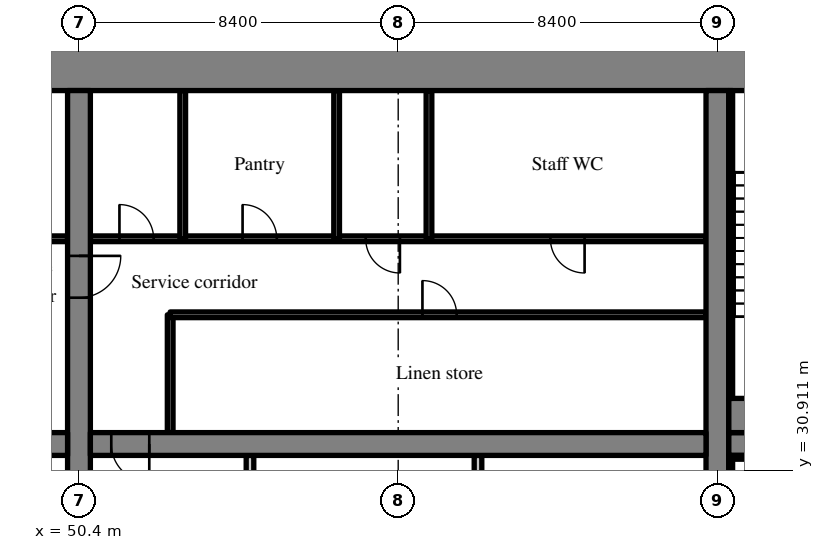
"""IFC4 building model, lengths in metres.
Left out: names, types, materials, properties, quantities, classifications, styles, units other than length and angle.
Written with IfcOpenShell. Run it as: python <this file> out.ifc"""

import sys

from ifc_helpers import new_model, si_unit, direction, frame, frame_2d, origin, place, context, subcontext, project, spatial, rectangle, extrude, source, transform, mapped, element, fill, save


model = new_model("IFC4")
c1 = context("Model", 3, precision=1e-05, world=origin(), true_north=direction((0.0, 1.0)))
c2 = subcontext(c1, "Body", "Model", "MODEL_VIEW")
j1 = project(units=[si_unit("LENGTHUNIT", "METRE"), si_unit("PLANEANGLEUNIT", "RADIAN")], contexts=[c1])
p1 = place(None, origin())
s1 = spatial("IfcSite", under=j1, at=p1, CompositionType="ELEMENT")
p2 = place(p1, origin())
s2 = spatial("IfcBuilding", under=s1, at=p2, CompositionType="ELEMENT")
p3 = place(p2, frame((0.0, 0.0, 31.6)))
s3 = spatial("IfcBuildingStorey", under=s2, at=p3, CompositionType="ELEMENT", Elevation=31.6)
m1 = source(origin(), c2, "Body", "SweptSolid", [
    extrude(rectangle(XDim=50.4, YDim=1.1, at=frame_2d((25.2, 0.0))), origin(), (0.0, 0.0, 1.0), 3.52),
])
p4 = place(p3, frame((25.2, 41.45, 0.0), z_axis=(0.0, 0.0, 1.0), x_axis=(1.0, 0.0, 0.0)))
e1 = element("IfcWall", 1, at=p4, inside=s3, PredefinedType="SHEAR", context=c2, shape_type="MappedRepresentation", body=[
    mapped(m1, transform((0.0, 0.0, 0.0), scale=1.0)),
])
m2 = source(origin(), c2, "Body", "SweptSolid", [
    extrude(rectangle(XDim=17.8, YDim=0.6, at=frame_2d((8.9, 0.0))), origin(), (0.0, 0.0, 1.0), 3.52),
])
p5 = place(p3, frame((50.4, 23.1, 0.0), z_axis=(0.0, 0.0, 1.0), x_axis=(0.0, 1.0, 0.0)))
e2 = element("IfcWall", 2, at=p5, inside=s3, PredefinedType="SHEAR", context=c2, shape_type="MappedRepresentation", body=[
    mapped(m2, transform((0.0, 0.0, 0.0), scale=1.0)),
])
m3 = source(origin(), c2, "Body", "SweptSolid", [
    extrude(rectangle(XDim=1.1, YDim=2.1, at=frame_2d((0.55, 1.05))), frame((0.0, 0.31, 0.0), z_axis=(0.0, -1.0, 0.0), x_axis=(1.0, 0.0, 0.0)), (0.0, 0.0, 1.0), 0.62),
])
p6 = place(p5, frame((12.35, 0.0, 0.0)))
e3 = element("IfcOpeningElement", 3, at=p6, cuts=e2, PredefinedType="OPENING", context=c2, shape_type="MappedRepresentation", body=[
    mapped(m3, transform((0.0, 0.0, 0.0), scale=1.0)),
])
p7 = place(p3, frame((67.2, 23.1, 0.0), z_axis=(0.0, 0.0, 1.0), x_axis=(0.0, 1.0, 0.0)))
e4 = element("IfcWall", 4, at=p7, inside=s3, PredefinedType="SHEAR", context=c2, shape_type="MappedRepresentation", body=[
    mapped(m2, transform((0.0, 0.0, 0.0), scale=1.0)),
])
m4 = source(origin(), c2, "Body", "SweptSolid", [
    extrude(rectangle(XDim=16.2, YDim=0.6, at=frame_2d((8.1, 0.0))), origin(), (0.0, 0.0, 1.0), 3.52),
])
p8 = place(p3, frame((33.9, 31.6, 0.0), z_axis=(0.0, 0.0, 1.0), x_axis=(1.0, 0.0, 0.0)))
e5 = element("IfcWall", 5, at=p8, inside=s3, PredefinedType="SHEAR", context=c2, shape_type="MappedRepresentation", body=[
    mapped(m4, transform((0.0, 0.0, 0.0), scale=1.0)),
])
m5 = source(origin(), c2, "Body", "SweptSolid", [
    extrude(rectangle(XDim=1.0, YDim=2.1, at=frame_2d((0.5, 1.05))), frame((0.0, 0.31, 0.0), z_axis=(0.0, -1.0, 0.0), x_axis=(1.0, 0.0, 0.0)), (0.0, 0.0, 1.0), 0.62),
])
p9 = place(p8, frame((14.65, 0.0, 0.0)))
e6 = element("IfcOpeningElement", 6, at=p9, cuts=e5, PredefinedType="OPENING", context=c2, shape_type="MappedRepresentation", body=[
    mapped(m5, transform((0.0, 0.0, 0.0), scale=1.0)),
])
m6 = source(origin(), c2, "Body", "SweptSolid", [
    extrude(rectangle(XDim=16.2, YDim=0.6, at=frame_2d((8.1, 0.0))), origin(), (0.0, 0.0, 1.0), 3.52),
])
p10 = place(p3, frame((50.7, 31.6, 0.0), z_axis=(0.0, 0.0, 1.0), x_axis=(1.0, 0.0, 0.0)))
e7 = element("IfcWall", 7, at=p10, inside=s3, PredefinedType="SHEAR", context=c2, shape_type="MappedRepresentation", body=[
    mapped(m6, transform((0.0, 0.0, 0.0), scale=1.0)),
])
p11 = place(p10, frame((0.55, 0.0, 0.0)))
e8 = element("IfcOpeningElement", 8, at=p11, cuts=e7, PredefinedType="OPENING", context=c2, shape_type="MappedRepresentation", body=[
    mapped(m5, transform((0.0, 0.0, 0.0), scale=1.0)),
])
m7 = source(origin(), c2, "Body", "SweptSolid", [
    extrude(rectangle(XDim=7.0, YDim=0.6, at=frame_2d((3.5, 0.0))), origin(), (0.0, 0.0, 1.0), 3.52),
])
p12 = place(p3, frame((67.5, 31.6, 0.0), z_axis=(0.0, 0.0, 1.0), x_axis=(1.0, 0.0, 0.0)))
e9 = element("IfcWall", 9, at=p12, inside=s3, PredefinedType="SHEAR", context=c2, shape_type="MappedRepresentation", body=[
    mapped(m7, transform((0.0, 0.0, 0.0), scale=1.0)),
])
p13 = place(p12, frame((5.425, 0.0, 0.0)))
e10 = element("IfcOpeningElement", 10, at=p13, cuts=e9, PredefinedType="OPENING", context=c2, shape_type="MappedRepresentation", body=[
    mapped(m3, transform((0.0, 0.0, 0.0), scale=1.0)),
])
m8 = source(origin(), c2, "Body", "SweptSolid", [
    extrude(rectangle(XDim=16.2, YDim=0.15, at=frame_2d((8.1, 0.0))), origin(), (0.0, 0.0, 1.0), 3.52),
])
p14 = place(p3, frame((33.9, 37.0, 0.0), z_axis=(0.0, 0.0, 1.0), x_axis=(1.0, 0.0, 0.0)))
e11 = element("IfcWall", 11, at=p14, inside=s3, PredefinedType="PARTITIONING", context=c2, shape_type="MappedRepresentation", body=[
    mapped(m8, transform((0.0, 0.0, 0.0), scale=1.0)),
])
m9 = source(origin(), c2, "Body", "SweptSolid", [
    extrude(rectangle(XDim=0.9, YDim=2.1, at=frame_2d((0.45, 1.05))), frame((0.0, 0.085, 0.0), z_axis=(0.0, -1.0, 0.0), x_axis=(1.0, 0.0, 0.0)), (0.0, 0.0, 1.0), 0.17),
])
p15 = place(p14, frame((1.575, 0.0, 0.0)))
e12 = element("IfcOpeningElement", 12, at=p15, cuts=e11, PredefinedType="OPENING", context=c2, shape_type="MappedRepresentation", body=[
    mapped(m9, transform((0.0, 0.0, 0.0), scale=1.0)),
])
p16 = place(p14, frame((7.245, 0.0, 0.0)))
e13 = element("IfcOpeningElement", 13, at=p16, cuts=e11, PredefinedType="OPENING", context=c2, shape_type="MappedRepresentation", body=[
    mapped(m9, transform((0.0, 0.0, 0.0), scale=1.0)),
])
p17 = place(p14, frame((12.105, 0.0, 0.0)))
e14 = element("IfcOpeningElement", 14, at=p17, cuts=e11, PredefinedType="OPENING", context=c2, shape_type="MappedRepresentation", body=[
    mapped(m9, transform((0.0, 0.0, 0.0), scale=1.0)),
])
p18 = place(p14, frame((14.535, 0.0, 0.0)))
e15 = element("IfcOpeningElement", 15, at=p18, cuts=e11, PredefinedType="OPENING", context=c2, shape_type="MappedRepresentation", body=[
    mapped(m9, transform((0.0, 0.0, 0.0), scale=1.0)),
])
m10 = source(origin(), c2, "Body", "SweptSolid", [
    extrude(rectangle(XDim=8.2, YDim=0.2, at=frame_2d((4.1, 0.0))), origin(), (0.0, 0.0, 1.0), 3.52),
])
for number, where, z_axis, x_axis in (
    (16, (54.9, 23.1, 0.0), (0.0, 0.0, 1.0), (0.0, 1.0, 0.0)),
    (17, (60.9, 23.1, 0.0), (0.0, 0.0, 1.0), (0.0, 1.0, 0.0)),
):
    element("IfcWall", number, at=place(p3, frame(where, z_axis=z_axis, x_axis=x_axis)), inside=s3, PredefinedType="PARTITIONING", context=c2, shape_type="MappedRepresentation", body=[
        mapped(m10, transform((0.0, 0.0, 0.0), scale=1.0)),
    ])
m11 = source(origin(), c2, "Body", "SweptSolid", [
    extrude(rectangle(XDim=3.1, YDim=0.15, at=frame_2d((1.55, 0.0))), origin(), (0.0, 0.0, 1.0), 3.52),
])
p19 = place(p3, frame((52.8, 31.9, 0.0), z_axis=(0.0, 0.0, 1.0), x_axis=(0.0, 1.0, 0.0)))
e18 = element("IfcWall", 18, at=p19, inside=s3, PredefinedType="PARTITIONING", context=c2, shape_type="MappedRepresentation", body=[
    mapped(m11, transform((0.0, 0.0, 0.0), scale=1.0)),
])
m12 = source(origin(), c2, "Body", "SweptSolid", [
    extrude(rectangle(XDim=14.1, YDim=0.15, at=frame_2d((7.05, 0.0))), origin(), (0.0, 0.0, 1.0), 3.52),
])
p20 = place(p3, frame((66.9, 35.0, 0.0), z_axis=(0.0, 0.0, 1.0), x_axis=(-1.0, 0.0, 0.0)))
e19 = element("IfcWall", 19, at=p20, inside=s3, PredefinedType="PARTITIONING", context=c2, shape_type="MappedRepresentation", body=[
    mapped(m12, transform((0.0, 0.0, 0.0), scale=1.0)),
])
p21 = place(p20, frame((6.562, 0.0, 0.0)))
e20 = element("IfcOpeningElement", 20, at=p21, cuts=e19, PredefinedType="OPENING", context=c2, shape_type="MappedRepresentation", body=[
    mapped(m9, transform((0.0, 0.0, 0.0), scale=1.0)),
])
m13 = source(origin(), c2, "Body", "SweptSolid", [
    extrude(rectangle(XDim=16.2, YDim=0.15, at=frame_2d((8.1, 0.0))), origin(), (0.0, 0.0, 1.0), 3.52),
])
p22 = place(p3, frame((66.9, 37.0, 0.0), z_axis=(0.0, 0.0, 1.0), x_axis=(-1.0, 0.0, 0.0)))
e21 = element("IfcWall", 21, at=p22, inside=s3, PredefinedType="PARTITIONING", context=c2, shape_type="MappedRepresentation", body=[
    mapped(m13, transform((0.0, 0.0, 0.0), scale=1.0)),
])
p23 = place(p22, frame((3.195, 0.0, 0.0)))
e22 = element("IfcOpeningElement", 22, at=p23, cuts=e21, PredefinedType="OPENING", context=c2, shape_type="MappedRepresentation", body=[
    mapped(m9, transform((0.0, 0.0, 0.0), scale=1.0)),
])
p24 = place(p22, frame((8.055, 0.0, 0.0)))
e23 = element("IfcOpeningElement", 23, at=p24, cuts=e21, PredefinedType="OPENING", context=c2, shape_type="MappedRepresentation", body=[
    mapped(m9, transform((0.0, 0.0, 0.0), scale=1.0)),
])
p25 = place(p22, frame((11.295, 0.0, 0.0)))
e24 = element("IfcOpeningElement", 24, at=p25, cuts=e21, PredefinedType="OPENING", context=c2, shape_type="MappedRepresentation", body=[
    mapped(m9, transform((0.0, 0.0, 0.0), scale=1.0)),
])
p26 = place(p22, frame((14.535, 0.0, 0.0)))
e25 = element("IfcOpeningElement", 25, at=p26, cuts=e21, PredefinedType="OPENING", context=c2, shape_type="MappedRepresentation", body=[
    mapped(m9, transform((0.0, 0.0, 0.0), scale=1.0)),
])
m14 = source(origin(), c2, "Body", "SweptSolid", [
    extrude(rectangle(XDim=3.9, YDim=0.15, at=frame_2d((1.95, 0.0))), origin(), (0.0, 0.0, 1.0), 3.52),
])
for number, where, z_axis, x_axis in (
    (26, (59.61, 37.0, 0.0), (0.0, 0.0, 1.0), (0.0, 1.0, 0.0)),
    (27, (57.18, 37.0, 0.0), (0.0, 0.0, 1.0), (0.0, 1.0, 0.0)),
    (28, (53.13, 37.0, 0.0), (0.0, 0.0, 1.0), (0.0, 1.0, 0.0)),
):
    element("IfcWall", number, at=place(p3, frame(where, z_axis=z_axis, x_axis=x_axis)), inside=s3, PredefinedType="PARTITIONING", context=c2, shape_type="MappedRepresentation", body=[
        mapped(m14, transform((0.0, 0.0, 0.0), scale=1.0)),
    ])
m15 = source(origin(), c2, "Body", "SweptSolid", [
    extrude(rectangle(XDim=4.75, YDim=0.1, at=frame_2d((2.375, 0.0))), origin(), (0.0, 0.0, 1.0), 3.52),
])
p27 = place(p3, frame((67.5, 31.25, 0.0), z_axis=(0.0, 0.0, 1.0), x_axis=(1.0, 0.0, 0.0)))
e29 = element("IfcWall", 29, at=p27, inside=s3, PredefinedType="SOLIDWALL", context=c2, shape_type="MappedRepresentation", body=[
    mapped(m15, transform((0.0, 0.0, 0.0), scale=1.0)),
])
m16 = source(origin(), c2, "Body", "SweptSolid", [
    extrude(rectangle(XDim=8.1, YDim=0.1, at=frame_2d((4.05, 0.0))), origin(), (0.0, 0.0, 1.0), 3.52),
])
p28 = place(p3, frame((67.55, 23.1, 0.0), z_axis=(0.0, 0.0, 1.0), x_axis=(0.0, 1.0, 0.0)))
e30 = element("IfcWall", 30, at=p28, inside=s3, PredefinedType="SOLIDWALL", context=c2, shape_type="MappedRepresentation", body=[
    mapped(m16, transform((0.0, 0.0, 0.0), scale=1.0)),
])
m17 = source(origin(), c2, "Body", "SweptSolid", [
    extrude(rectangle(XDim=4.75, YDim=0.9, at=frame_2d((2.375, 0.0))), origin(), (0.0, 0.0, 1.0), 3.52),
])
p29 = place(p3, frame((67.5, 32.35, 0.0), z_axis=(0.0, 0.0, 1.0), x_axis=(1.0, 0.0, 0.0)))
e31 = element("IfcWall", 31, at=p29, inside=s3, PredefinedType="SOLIDWALL", context=c2, shape_type="MappedRepresentation", body=[
    mapped(m17, transform((0.0, 0.0, 0.0), scale=1.0)),
])
p30 = place(p3, frame((67.55, 32.8, 0.0), z_axis=(0.0, 0.0, 1.0), x_axis=(0.0, 1.0, 0.0)))
e32 = element("IfcWall", 32, at=p30, inside=s3, PredefinedType="SOLIDWALL", context=c2, shape_type="MappedRepresentation", body=[
    mapped(m16, transform((0.0, 0.0, 0.0), scale=1.0)),
])
m18 = source(origin(), c2, "Body", "SweptSolid", [
    extrude(rectangle(XDim=1.0, YDim=2.1, at=frame_2d((0.5, 1.05))), frame((0.0, 0.025, 0.0), z_axis=(0.0, -1.0, 0.0), x_axis=(1.0, 0.0, 0.0)), (0.0, 0.0, 1.0), 0.05),
])
p31 = place(p11, origin())
e33 = element("IfcDoor", 33, at=p31, inside=s3, OperationType="SINGLE_SWING_RIGHT", PredefinedType="DOOR", context=c2, shape_type="MappedRepresentation", body=[
    mapped(m18, transform((0.0, 0.0, 0.0), scale=1.0)),
])
fill(e8, e33)
m19 = source(origin(), c2, "Body", "SweptSolid", [
    extrude(rectangle(XDim=0.9, YDim=2.1, at=frame_2d((0.45, 1.05))), frame((0.0, 0.025, 0.0), z_axis=(0.0, -1.0, 0.0), x_axis=(1.0, 0.0, 0.0)), (0.0, 0.0, 1.0), 0.05),
])
p32 = place(p21, origin())
e34 = element("IfcDoor", 34, at=p32, inside=s3, OperationType="SINGLE_SWING_RIGHT", PredefinedType="DOOR", context=c2, shape_type="MappedRepresentation", body=[
    mapped(m19, transform((0.0, 0.0, 0.0), scale=1.0)),
])
fill(e20, e34)
p33 = place(p23, origin())
e35 = element("IfcDoor", 35, at=p33, inside=s3, OperationType="SINGLE_SWING_LEFT", PredefinedType="DOOR", context=c2, shape_type="MappedRepresentation", body=[
    mapped(m19, transform((0.0, 0.0, 0.0), scale=1.0)),
])
fill(e22, e35)
p34 = place(p24, origin())
e36 = element("IfcDoor", 36, at=p34, inside=s3, OperationType="SINGLE_SWING_LEFT", PredefinedType="DOOR", context=c2, shape_type="MappedRepresentation", body=[
    mapped(m19, transform((0.0, 0.0, 0.0), scale=1.0)),
])
fill(e23, e36)
p35 = place(p25, origin())
e37 = element("IfcDoor", 37, at=p35, inside=s3, OperationType="SINGLE_SWING_RIGHT", PredefinedType="DOOR", context=c2, shape_type="MappedRepresentation", body=[
    mapped(m19, transform((0.0, 0.0, 0.0), scale=1.0)),
])
fill(e24, e37)
p36 = place(p26, origin())
e38 = element("IfcDoor", 38, at=p36, inside=s3, OperationType="SINGLE_SWING_RIGHT", PredefinedType="DOOR", context=c2, shape_type="MappedRepresentation", body=[
    mapped(m19, transform((0.0, 0.0, 0.0), scale=1.0)),
])
fill(e25, e38)
m20 = source(origin(), c2, "Body", "SweptSolid", [
    extrude(rectangle(XDim=1.1, YDim=2.1, at=frame_2d((0.55, 1.05))), frame((0.0, 0.025, 0.0), z_axis=(0.0, -1.0, 0.0), x_axis=(1.0, 0.0, 0.0)), (0.0, 0.0, 1.0), 0.05),
])
p37 = place(p6, origin())
e39 = element("IfcDoor", 39, at=p37, inside=s3, OperationType="SINGLE_SWING_RIGHT", PredefinedType="DOOR", context=c2, shape_type="MappedRepresentation", body=[
    mapped(m20, transform((0.0, 0.0, 0.0), scale=1.0)),
])
fill(e3, e39)
save(model, sys.argv[1])
